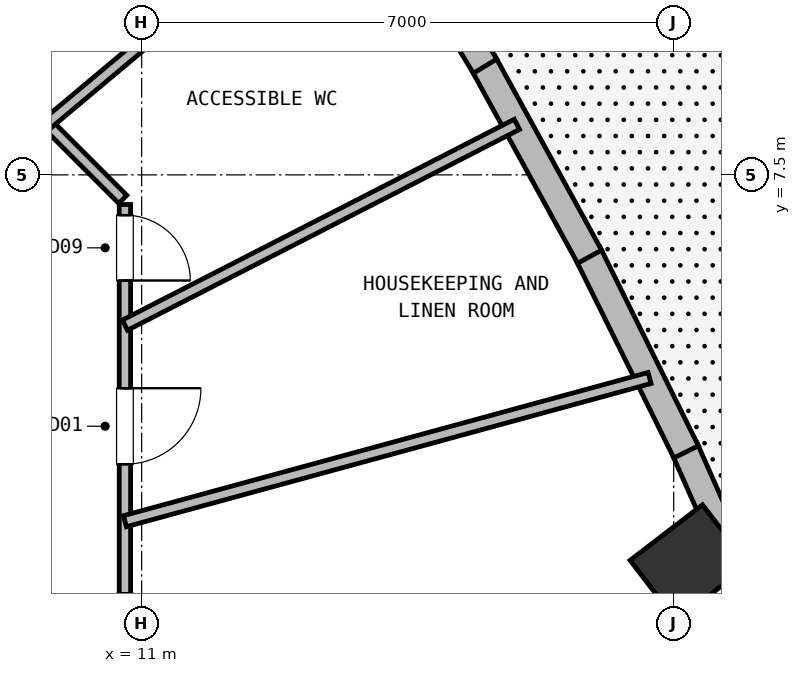
"""IFC4 building model, lengths in metres.
Left out: names, types, materials, properties, quantities, classifications, styles, units other than length and angle.
Written with IfcOpenShell. Run it as: python <this file> out.ifc"""

import sys

from ifc_helpers import new_model, si_unit, direction, frame, frame_2d, origin, origin_2d, place, context, subcontext, project, spatial, rectangle, extrude, element, fill, save


model = new_model("IFC4")
c1 = context("Model", 3, precision=1e-05, world=origin(), true_north=direction((0.0, 1.0)))
c2 = subcontext(c1, "Body", "Model", "MODEL_VIEW")
j1 = project(units=[si_unit("LENGTHUNIT", "METRE"), si_unit("PLANEANGLEUNIT", "RADIAN")], contexts=[c1])
p1 = place(None, origin())
s1 = spatial("IfcSite", under=j1, at=p1, CompositionType="ELEMENT")
p2 = place(p1, origin())
s2 = spatial("IfcBuilding", under=s1, at=p2, CompositionType="ELEMENT")
p3 = place(p2, frame((0.0, 0.0, 30.5)))
s3 = spatial("IfcBuildingStorey", under=s2, at=p3, CompositionType="ELEMENT", Elevation=30.5)
p4 = place(p3, frame((18.207, 2.397, 0.0), z_axis=(0.0, 0.0, 1.0), x_axis=(-0.608761429009, 0.793353340291, 0.0)))
e1 = element("IfcColumn", 1, at=p4, inside=s3, PredefinedType="COLUMN", context=c2, shape_type="SweptSolid", body=[
    extrude(rectangle(XDim=1.0, YDim=1.2, at=origin_2d()), origin(), (0.0, 0.0, 1.0), 3.75),
])
p5 = place(p3, frame((18.143, 3.901, 0.0), z_axis=(0.0, 0.0, 1.0), x_axis=(0.405100583427, -0.914272124319, 0.0)))
e2 = element("IfcWall", 2, at=p5, inside=s3, PredefinedType="SOLIDWALL", context=c2, shape_type="SweptSolid", body=[
    extrude(rectangle(XDim=2.925, YDim=0.36, at=frame_2d((1.463, 0.0))), origin(), (0.0, 0.0, 1.0), 3.5),
])
p6 = place(p3, frame((16.871, 6.468, 0.0), z_axis=(0.0, 0.0, 1.0), x_axis=(0.44365878996, -0.896195781117, 0.0)))
e3 = element("IfcWall", 3, at=p6, inside=s3, PredefinedType="SOLIDWALL", context=c2, shape_type="SweptSolid", body=[
    extrude(rectangle(XDim=2.915, YDim=0.36, at=frame_2d((1.458, 0.0))), origin(), (0.0, 0.0, 1.0), 3.5),
])
p7 = place(p3, frame((15.493, 8.974, 0.0), z_axis=(0.0, 0.0, 1.0), x_axis=(0.481319495438, -0.876545231754, 0.0)))
e4 = element("IfcWall", 4, at=p7, inside=s3, PredefinedType="SOLIDWALL", context=c2, shape_type="SweptSolid", body=[
    extrude(rectangle(XDim=2.909, YDim=0.36, at=frame_2d((1.455, 0.0))), origin(), (0.0, 0.0, 1.0), 3.5),
])
p8 = place(p3, frame((14.01, 11.419, 0.0), z_axis=(0.0, 0.0, 1.0), x_axis=(0.518463491903, -0.855099764685, 0.0)))
e5 = element("IfcWall", 5, at=p8, inside=s3, PredefinedType="SOLIDWALL", context=c2, shape_type="SweptSolid", body=[
    extrude(rectangle(XDim=2.91, YDim=0.36, at=frame_2d((1.455, 0.0))), origin(), (0.0, 0.0, 1.0), 3.5),
])
p9 = place(p3, frame((10.78, 7.11, 0.0), z_axis=(0.0, 0.0, 1.0), x_axis=(0.0, -1.0, 0.0)))
e6 = element("IfcWall", 6, at=p9, inside=s3, PredefinedType="PARTITIONING", context=c2, shape_type="SweptSolid", body=[
    extrude(rectangle(XDim=14.22, YDim=0.15, at=frame_2d((7.11, 0.0))), origin(), (0.0, 0.0, 1.0), 3.12),
])
p10 = place(p9, frame((0.14, 0.0, 0.0)))
e7 = element("IfcOpeningElement", 7, at=p10, cuts=e6, PredefinedType="OPENING", context=c2, shape_type="SweptSolid", body=[
    extrude(rectangle(XDim=0.86, YDim=2.05, at=frame_2d((0.43, 1.025))), frame((0.0, 0.085, 0.0), z_axis=(0.0, -1.0, 0.0), x_axis=(1.0, 0.0, 0.0)), (0.0, 0.0, 1.0), 0.17),
])
p11 = place(p9, frame((2.417, 0.0, 0.0)))
e8 = element("IfcOpeningElement", 8, at=p11, cuts=e6, PredefinedType="OPENING", context=c2, shape_type="SweptSolid", body=[
    extrude(rectangle(XDim=1.0, YDim=2.15, at=frame_2d((0.5, 1.075))), frame((0.0, 0.085, 0.0), z_axis=(0.0, -1.0, 0.0), x_axis=(1.0, 0.0, 0.0)), (0.0, 0.0, 1.0), 0.17),
])
p12 = place(p9, frame((5.115, 0.0, 0.0)))
e9 = element("IfcOpeningElement", 9, at=p12, cuts=e6, PredefinedType="OPENING", context=c2, shape_type="SweptSolid", body=[
    extrude(rectangle(XDim=1.0, YDim=2.15, at=frame_2d((0.5, 1.075))), frame((0.0, 0.085, 0.0), z_axis=(0.0, -1.0, 0.0), x_axis=(1.0, 0.0, 0.0)), (0.0, 0.0, 1.0), 0.17),
])
p13 = place(p9, frame((10.639, 0.0, 0.0)))
e10 = element("IfcOpeningElement", 10, at=p13, cuts=e6, PredefinedType="OPENING", context=c2, shape_type="SweptSolid", body=[
    extrude(rectangle(XDim=1.06, YDim=2.15, at=frame_2d((0.53, 1.075))), frame((0.0, 0.085, 0.0), z_axis=(0.0, -1.0, 0.0), x_axis=(1.0, 0.0, 0.0)), (0.0, 0.0, 1.0), 0.17),
])
p14 = place(p3, frame((8.578, 9.352, 0.0), z_axis=(0.0, 0.0, 1.0), x_axis=(0.707067066127, -0.707146494016, 0.0)))
e11 = element("IfcWall", 11, at=p14, inside=s3, PredefinedType="PARTITIONING", context=c2, shape_type="SweptSolid", body=[
    extrude(rectangle(XDim=3.074, YDim=0.15, at=frame_2d((1.537, 0.0))), origin(), (0.0, 0.0, 1.0), 3.5),
])
p15 = place(p3, frame((9.756, 8.174, 0.0), z_axis=(0.0, 0.0, 1.0), x_axis=(0.766556770399, 0.642176547186, 0.0)))
e12 = element("IfcWall", 12, at=p15, inside=s3, PredefinedType="PARTITIONING", context=c2, shape_type="SweptSolid", body=[
    extrude(rectangle(XDim=5.37, YDim=0.15, at=frame_2d((2.685, 0.0))), origin(), (0.0, 0.0, 1.0), 3.5),
])
p16 = place(p3, frame((10.78, 2.943, 0.0), z_axis=(0.0, 0.0, 1.0), x_axis=(0.964692920296, 0.263377238063, 0.0)))
e13 = element("IfcWall", 13, at=p16, inside=s3, PredefinedType="PARTITIONING", context=c2, shape_type="SweptSolid", body=[
    extrude(rectangle(XDim=7.155, YDim=0.15, at=frame_2d((3.578, 0.0))), origin(), (0.0, 0.0, 1.0), 3.5),
])
p17 = place(p3, frame((10.78, 5.522, 0.0), z_axis=(0.0, 0.0, 1.0), x_axis=(0.889994161799, 0.455971920149, 0.0)))
e14 = element("IfcWall", 14, at=p17, inside=s3, PredefinedType="PARTITIONING", context=c2, shape_type="SweptSolid", body=[
    extrude(rectangle(XDim=5.795, YDim=0.15, at=frame_2d((2.897, 0.0))), origin(), (0.0, 0.0, 1.0), 3.5),
])
p18 = place(p10, origin())
e15 = element("IfcDoor", 15, at=p18, inside=s3, OperationType="SINGLE_SWING_RIGHT", PredefinedType="DOOR", context=c2, shape_type="SweptSolid", body=[
    extrude(rectangle(XDim=0.86, YDim=2.05, at=frame_2d((0.43, 1.025))), frame((0.0, 0.025, 0.0), z_axis=(0.0, -1.0, 0.0), x_axis=(1.0, 0.0, 0.0)), (0.0, 0.0, 1.0), 0.05),
])
fill(e7, e15)
p19 = place(p11, origin())
e16 = element("IfcDoor", 16, at=p19, inside=s3, OperationType="SINGLE_SWING_LEFT", PredefinedType="DOOR", context=c2, shape_type="SweptSolid", body=[
    extrude(rectangle(XDim=1.0, YDim=2.15, at=frame_2d((0.5, 1.075))), frame((0.0, 0.025, 0.0), z_axis=(0.0, -1.0, 0.0), x_axis=(1.0, 0.0, 0.0)), (0.0, 0.0, 1.0), 0.05),
])
fill(e8, e16)
save(model, sys.argv[1])
